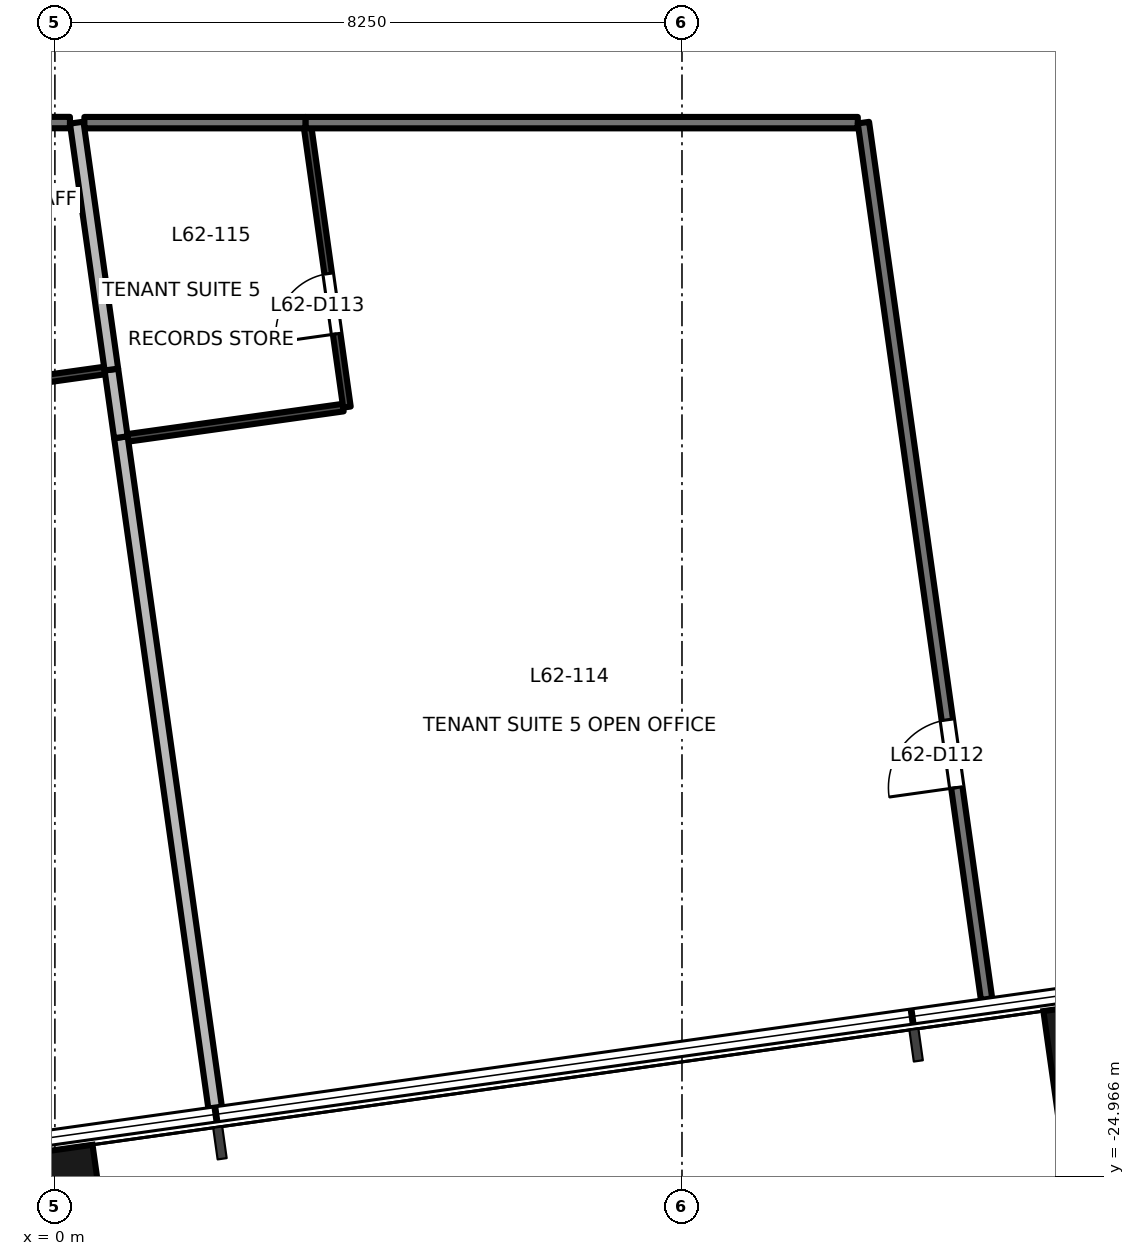
"""IFC4 building model, lengths in metres.
Left out: names, types, materials, properties, quantities, classifications, styles, units other than length and angle.
Written with IfcOpenShell. Run it as: python <this file> out.ifc"""

import sys

from ifc_helpers import new_model, si_unit, direction, frame, frame_2d, origin, origin_2d, place, context, subcontext, project, spatial, rectangle, extrude, element, fill, save


model = new_model("IFC4")
c1 = context("Model", 3, precision=1e-05, world=origin(), true_north=direction((0.0, 1.0)))
c2 = subcontext(c1, "Body", "Model", "MODEL_VIEW")
j1 = project(units=[si_unit("LENGTHUNIT", "METRE"), si_unit("PLANEANGLEUNIT", "RADIAN")], contexts=[c1])
p1 = place(None, origin())
s1 = spatial("IfcSite", under=j1, at=p1, CompositionType="ELEMENT")
p2 = place(p1, origin())
s2 = spatial("IfcBuilding", under=s1, at=p2, CompositionType="ELEMENT")
p3 = place(p2, frame((0.0, 0.0, 270.7)))
s3 = spatial("IfcBuildingStorey", under=s2, at=p3, CompositionType="ELEMENT", Elevation=270.7)
for number, where, z_axis, x_axis in (
    (1, (0.125, -25.508, -0.2), (0.0, 0.0, 1.0), (0.99, 0.139, 0.0)),
    (2, (13.625, -23.61, -0.2), (0.0, 0.0, 1.0), (0.99, 0.139, 0.0)),
):
    element("IfcColumn", number, at=place(p3, frame(where, z_axis=z_axis, x_axis=x_axis)), inside=s3, PredefinedType="COLUMN", context=c2, shape_type="SweptSolid", body=[
        extrude(rectangle(XDim=1.0, YDim=1.8, at=origin_2d()), origin(), (0.0, 0.0, 1.0), 3.9),
    ])
p4 = place(p3, frame((0.198, -11.099, 0.0), z_axis=(0.0, 0.0, 1.0), x_axis=(-1.0, 0.0, 0.0)))
e3 = element("IfcWall", 3, at=p4, inside=s3, PredefinedType="PARTITIONING", context=c2, shape_type="SweptSolid", body=[
    extrude(rectangle(XDim=3.241, YDim=0.15, at=frame_2d((1.621, 0.0))), origin(), (0.0, 0.0, 1.0), 2.9),
])
p5 = place(p3, frame((10.563, -11.1, 0.0), z_axis=(0.0, 0.0, 1.0), x_axis=(-1.0, 0.0, 0.0)))
e4 = element("IfcWall", 4, at=p5, inside=s3, PredefinedType="PARTITIONING", context=c2, shape_type="SweptSolid", body=[
    extrude(rectangle(XDim=7.267, YDim=0.15, at=frame_2d((3.634, 0.0))), origin(), (0.0, 0.0, 1.0), 2.9),
])
p6 = place(p3, frame((12.257, -22.631, 0.0), z_axis=(0.0, 0.0, 1.0), x_axis=(-0.139134361512, 0.990273512443, 0.0)))
e5 = element("IfcWall", 5, at=p6, inside=s3, PredefinedType="PARTITIONING", context=c2, shape_type="SweptSolid", body=[
    extrude(rectangle(XDim=11.644, YDim=0.15, at=frame_2d((5.822, 0.0))), origin(), (0.0, 0.0, 1.0), 3.7),
])
p7 = place(p6, frame((2.811, 0.0, 0.0)))
e6 = element("IfcOpeningElement", 6, at=p7, cuts=e5, PredefinedType="OPENING", context=c2, shape_type="SweptSolid", body=[
    extrude(rectangle(XDim=0.9, YDim=2.1, at=frame_2d((0.45, 1.05))), frame((0.0, 0.085, 0.0), z_axis=(0.0, -1.0, 0.0), x_axis=(1.0, 0.0, 0.0)), (0.0, 0.0, 1.0), 0.171),
])
p8 = place(p3, frame((3.296, -11.1, 0.0), z_axis=(0.0, 0.0, 1.0), x_axis=(-1.0, 0.0, 0.0)))
e7 = element("IfcWall", 7, at=p8, inside=s3, PredefinedType="PARTITIONING", context=c2, shape_type="SweptSolid", body=[
    extrude(rectangle(XDim=2.908, YDim=0.15, at=frame_2d((1.454, 0.0))), origin(), (0.0, 0.0, 1.0), 3.7),
])
p9 = place(p3, frame((-2.492, -14.803, 0.0), z_axis=(0.0, 0.0, 1.0), x_axis=(0.990278754473, 0.139097046841, 0.0)))
e8 = element("IfcWall", 8, at=p9, inside=s3, PredefinedType="PARTITIONING", context=c2, shape_type="SweptSolid", body=[
    extrude(rectangle(XDim=3.177, YDim=0.1, at=frame_2d((1.588, 0.0))), origin(), (0.0, 0.0, 1.0), 2.9),
])
p10 = place(p3, frame((0.868, -15.239, 0.0), z_axis=(0.0, 0.0, 1.0), x_axis=(0.139233409815, -0.990259591012, 0.0)))
e9 = element("IfcWall", 9, at=p10, inside=s3, PredefinedType="PARTITIONING", context=c2, shape_type="SweptSolid", body=[
    extrude(rectangle(XDim=8.906, YDim=0.18, at=frame_2d((4.453, 0.0))), origin(), (0.0, 0.0, 1.0), 3.7),
])
p11 = place(p3, frame((0.743, -14.349, 0.0), z_axis=(0.0, 0.0, 1.0), x_axis=(0.139100809785, -0.990278225913, 0.0)))
e10 = element("IfcWall", 10, at=p11, inside=s3, PredefinedType="PARTITIONING", context=c2, shape_type="SweptSolid", body=[
    extrude(rectangle(XDim=0.899, YDim=0.18, at=frame_2d((0.449, 0.0))), origin(), (0.0, 0.0, 1.0), 3.7),
])
p12 = place(p3, frame((0.287, -11.1, 0.0), z_axis=(0.0, 0.0, 1.0), x_axis=(0.13898222456, -0.990294875911, 0.0)))
e11 = element("IfcWall", 11, at=p12, inside=s3, PredefinedType="PARTITIONING", context=c2, shape_type="SweptSolid", body=[
    extrude(rectangle(XDim=3.28, YDim=0.18, at=frame_2d((1.64, 0.0))), origin(), (0.0, 0.0, 1.0), 3.7),
])
p13 = place(p3, frame((0.96, -15.247, 0.0), z_axis=(0.0, 0.0, 1.0), x_axis=(0.990271288443, 0.139150189669, 0.0)))
e12 = element("IfcWall", 12, at=p13, inside=s3, PredefinedType="PARTITIONING", context=c2, shape_type="SweptSolid", body=[
    extrude(rectangle(XDim=2.86, YDim=0.1, at=frame_2d((1.43, 0.0))), origin(), (0.0, 0.0, 1.0), 3.7),
])
p14 = place(p3, frame((3.842, -14.842, 0.0), z_axis=(0.0, 0.0, 1.0), x_axis=(-0.139108634852, 0.990277126722, 0.0)))
e13 = element("IfcWall", 13, at=p14, inside=s3, PredefinedType="PARTITIONING", context=c2, shape_type="SweptSolid", body=[
    extrude(rectangle(XDim=3.71, YDim=0.1, at=frame_2d((1.855, 0.0))), origin(), (0.0, 0.0, 1.0), 3.7),
])
p15 = place(p14, frame((0.973, 0.0, 0.0)))
e14 = element("IfcOpeningElement", 14, at=p15, cuts=e13, PredefinedType="OPENING", context=c2, shape_type="SweptSolid", body=[
    extrude(rectangle(XDim=0.8, YDim=2.1, at=frame_2d((0.4, 1.05))), frame((0.0, 0.061, 0.0), z_axis=(0.0, -1.0, 0.0), x_axis=(1.0, 0.0, 0.0)), (0.0, 0.0, 1.0), 0.121),
])
p16 = place(p7, origin())
e15 = element("IfcDoor", 15, at=p16, inside=s3, OperationType="SINGLE_SWING_LEFT", PredefinedType="DOOR", context=c2, shape_type="SweptSolid", body=[
    extrude(rectangle(XDim=0.9, YDim=2.1, at=frame_2d((0.45, 1.05))), frame((0.0, 0.025, 0.0), z_axis=(0.0, -1.0, 0.0), x_axis=(1.0, 0.0, 0.0)), (0.0, 0.0, 1.0), 0.05),
])
fill(e6, e15)
p17 = place(p15, origin())
e16 = element("IfcDoor", 16, at=p17, inside=s3, OperationType="SINGLE_SWING_LEFT", PredefinedType="DOOR", context=c2, shape_type="SweptSolid", body=[
    extrude(rectangle(XDim=0.8, YDim=2.1, at=frame_2d((0.4, 1.05))), frame((0.0, 0.025, 0.0), z_axis=(0.0, -1.0, 0.0), x_axis=(1.0, 0.0, 0.0)), (0.0, 0.0, 1.0), 0.05),
])
fill(e14, e16)
save(model, sys.argv[1])
